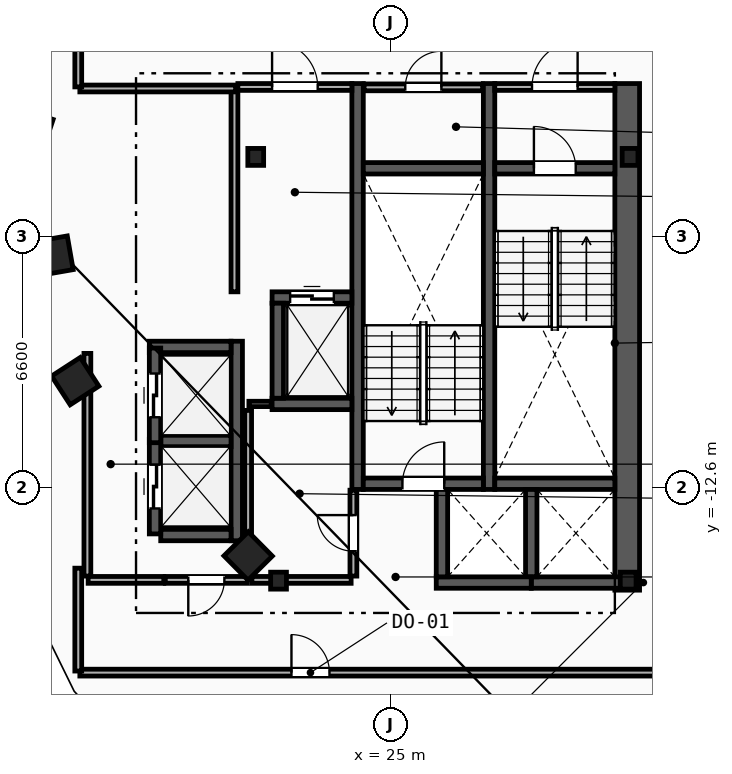
"""IFC4 building model, lengths in metres.
Left out: names, types, materials, properties, quantities, classifications, styles, units other than length and angle.
Written with IfcOpenShell. Run it as: python <this file> out.ifc"""

import sys

from ifc_helpers import new_model, si_unit, direction, frame, frame_2d, origin, origin_2d, place, context, subcontext, project, spatial, rectangle, i_section, extrude, element, fill, save


model = new_model("IFC4")
c1 = context("Model", 3, precision=1e-05, world=origin(), true_north=direction((0.0, 1.0)))
c2 = subcontext(c1, "Body", "Model", "MODEL_VIEW")
j1 = project(units=[si_unit("LENGTHUNIT", "METRE"), si_unit("PLANEANGLEUNIT", "RADIAN")], contexts=[c1])
p1 = place(None, origin())
s1 = spatial("IfcSite", under=j1, at=p1, CompositionType="ELEMENT")
p2 = place(p1, origin())
s2 = spatial("IfcBuilding", under=s1, at=p2, CompositionType="ELEMENT")
p3 = place(p2, frame((0.0, 0.0, 206.2)))
s3 = spatial("IfcBuildingStorey", under=s2, at=p3, CompositionType="ELEMENT", Elevation=206.2)
for number, where, z_axis, x_axis in (
    (1, (31.3, -3.9, 0.0), (0.0, 0.0, 1.0), (1.0, 0.0, 0.0)),
    (2, (21.45, -3.9, 0.0), (0.0, 0.0, 1.0), (1.0, 0.0, 0.0)),
    (3, (22.05, -15.05, 0.0), (0.0, 0.0, 1.0), (1.0, 0.0, 0.0)),
    (4, (31.25, -15.05, 0.0), (0.0, 0.0, 1.0), (1.0, 0.0, 0.0)),
):
    element("IfcColumn", number, at=place(p3, frame(where, z_axis=z_axis, x_axis=x_axis)), inside=s3, PredefinedType="COLUMN", context=c2, shape_type="SweptSolid", body=[
        extrude(i_section(OverallWidth=0.416, OverallDepth=0.446, WebThickness=0.039, FlangeThickness=0.063, FilletRadius=0.018, at=origin_2d()), origin(), (0.0, 0.0, 1.0), 3.6),
    ])
for number, where, z_axis, x_axis in (
    (5, (15.55, -3.2, 0.0), (0.0, 0.0, 1.0), (-0.315, -0.949, 0.0)),
    (6, (16.125, -6.5, 0.0), (0.0, 0.0, 1.0), (0.172, -0.985, 0.0)),
    (7, (16.7, -9.8, 0.0), (0.0, 0.0, 1.0), (0.544, -0.839, 0.0)),
    (8, (21.25, -14.4, 0.0), (0.0, 0.0, 1.0), (0.703, -0.711, 0.0)),
):
    element("IfcColumn", number, at=place(p3, frame(where, z_axis=z_axis, x_axis=x_axis)), inside=s3, PredefinedType="COLUMN", context=c2, shape_type="SweptSolid", body=[
        extrude(rectangle(XDim=0.9, YDim=0.9, at=origin_2d()), origin(), (0.0, 0.0, 1.0), 3.6),
    ])
p4 = place(p3, frame((31.225, -15.3, 0.0), z_axis=(0.0, 0.0, 1.0), x_axis=(0.0, 1.0, 0.0)))
e9 = element("IfcWall", 9, at=p4, inside=s3, PredefinedType="SHEAR", context=c2, shape_type="SweptSolid", body=[
    extrude(rectangle(XDim=13.33, YDim=0.65, at=frame_2d((6.665, 0.0))), origin(), (0.0, 0.0, 1.0), 3.34),
])
for number, where, z_axis, x_axis in (
    (10, (27.59, -12.65, 0.0), (0.0, 0.0, 1.0), (0.0, 1.0, 0.0)),
    (11, (24.13, -12.65, 0.0), (0.0, 0.0, 1.0), (0.0, 1.0, 0.0)),
):
    element("IfcWall", number, at=place(p3, frame(where, z_axis=z_axis, x_axis=x_axis)), inside=s3, PredefinedType="SHEAR", context=c2, shape_type="SweptSolid", body=[
        extrude(rectangle(XDim=10.68, YDim=0.3, at=frame_2d((5.34, 0.0))), origin(), (0.0, 0.0, 1.0), 3.34),
    ])
p5 = place(p3, frame((27.74, -4.2, 0.0), z_axis=(0.0, 0.0, 1.0), x_axis=(1.0, 0.0, 0.0)))
e12 = element("IfcWall", 12, at=p5, inside=s3, PredefinedType="SHEAR", context=c2, shape_type="SweptSolid", body=[
    extrude(rectangle(XDim=3.16, YDim=0.3, at=frame_2d((1.58, 0.0))), origin(), (0.0, 0.0, 1.0), 3.34),
])
p6 = place(p5, frame((1.03, 0.0, 0.0)))
e13 = element("IfcOpeningElement", 13, at=p6, cuts=e12, PredefinedType="OPENING", context=c2, shape_type="SweptSolid", body=[
    extrude(rectangle(XDim=1.1, YDim=2.15, at=frame_2d((0.55, 1.075))), frame((0.0, 0.16, 0.0), z_axis=(0.0, -1.0, 0.0), x_axis=(1.0, 0.0, 0.0)), (0.0, 0.0, 1.0), 0.32),
])
p7 = place(p3, frame((27.74, -12.5, 0.0), z_axis=(0.0, 0.0, 1.0), x_axis=(1.0, 0.0, 0.0)))
e14 = element("IfcWall", 14, at=p7, inside=s3, PredefinedType="SHEAR", context=c2, shape_type="SweptSolid", body=[
    extrude(rectangle(XDim=3.16, YDim=0.3, at=frame_2d((1.58, 0.0))), origin(), (0.0, 0.0, 1.0), 3.34),
])
p8 = place(p3, frame((24.28, -12.5, 0.0), z_axis=(0.0, 0.0, 1.0), x_axis=(1.0, 0.0, 0.0)))
e15 = element("IfcWall", 15, at=p8, inside=s3, PredefinedType="SHEAR", context=c2, shape_type="SweptSolid", body=[
    extrude(rectangle(XDim=3.16, YDim=0.3, at=frame_2d((1.58, 0.0))), origin(), (0.0, 0.0, 1.0), 3.34),
])
p9 = place(p8, frame((1.03, 0.0, 0.0)))
e16 = element("IfcOpeningElement", 16, at=p9, cuts=e15, PredefinedType="OPENING", context=c2, shape_type="SweptSolid", body=[
    extrude(rectangle(XDim=1.1, YDim=2.15, at=frame_2d((0.55, 1.075))), frame((0.0, 0.16, 0.0), z_axis=(0.0, -1.0, 0.0), x_axis=(1.0, 0.0, 0.0)), (0.0, 0.0, 1.0), 0.32),
])
p10 = place(p3, frame((24.28, -4.2, 0.0), z_axis=(0.0, 0.0, 1.0), x_axis=(1.0, 0.0, 0.0)))
e17 = element("IfcWall", 17, at=p10, inside=s3, PredefinedType="SHEAR", context=c2, shape_type="SweptSolid", body=[
    extrude(rectangle(XDim=3.16, YDim=0.3, at=frame_2d((1.58, 0.0))), origin(), (0.0, 0.0, 1.0), 3.34),
])
p11 = place(p3, frame((20.89, -7.45, 0.0), z_axis=(0.0, 0.0, 1.0), x_axis=(0.0, 1.0, 0.0)))
e18 = element("IfcWall", 18, at=p11, inside=s3, PredefinedType="PARTITIONING", context=c2, shape_type="SweptSolid", body=[
    extrude(rectangle(XDim=5.3, YDim=0.18, at=frame_2d((2.65, 0.0))), origin(), (0.0, 0.0, 1.0), 3.34),
])
p12 = place(p3, frame((20.98, -2.06, 0.0), z_axis=(0.0, 0.0, 1.0), x_axis=(1.0, 0.0, 0.0)))
e19 = element("IfcWall", 19, at=p12, inside=s3, PredefinedType="PARTITIONING", context=c2, shape_type="SweptSolid", body=[
    extrude(rectangle(XDim=3.0, YDim=0.18, at=frame_2d((1.5, 0.0))), origin(), (0.0, 0.0, 1.0), 3.34),
])
p13 = place(p12, frame((0.9, 0.0, 0.0)))
e20 = element("IfcOpeningElement", 20, at=p13, cuts=e19, PredefinedType="OPENING", context=c2, shape_type="SweptSolid", body=[
    extrude(rectangle(XDim=1.2, YDim=2.15, at=frame_2d((0.6, 1.075))), frame((0.0, 0.1, 0.0), z_axis=(0.0, -1.0, 0.0), x_axis=(1.0, 0.0, 0.0)), (0.0, 0.0, 1.0), 0.2),
])
p14 = place(p3, frame((27.74, -2.06, 0.0), z_axis=(0.0, 0.0, 1.0), x_axis=(1.0, 0.0, 0.0)))
e21 = element("IfcWall", 21, at=p14, inside=s3, PredefinedType="PARTITIONING", context=c2, shape_type="SweptSolid", body=[
    extrude(rectangle(XDim=3.16, YDim=0.18, at=frame_2d((1.58, 0.0))), origin(), (0.0, 0.0, 1.0), 3.34),
])
p15 = place(p14, frame((0.98, 0.0, 0.0)))
e22 = element("IfcOpeningElement", 22, at=p15, cuts=e21, PredefinedType="OPENING", context=c2, shape_type="SweptSolid", body=[
    extrude(rectangle(XDim=1.2, YDim=2.15, at=frame_2d((0.6, 1.075))), frame((0.0, 0.1, 0.0), z_axis=(0.0, -1.0, 0.0), x_axis=(1.0, 0.0, 0.0)), (0.0, 0.0, 1.0), 0.2),
])
p16 = place(p3, frame((21.88, -7.6, 0.0), z_axis=(0.0, 0.0, 1.0), x_axis=(1.0, 0.0, 0.0)))
e23 = element("IfcWall", 23, at=p16, inside=s3, PredefinedType="SHEAR", context=c2, shape_type="SweptSolid", body=[
    extrude(rectangle(XDim=2.1, YDim=0.3, at=frame_2d((1.05, 0.0))), origin(), (0.0, 0.0, 1.0), 3.34),
])
p17 = place(p16, frame((0.475, 0.0, 0.0)))
e24 = element("IfcOpeningElement", 24, at=p17, cuts=e23, PredefinedType="OPENING", context=c2, shape_type="SweptSolid", body=[
    extrude(rectangle(XDim=1.15, YDim=2.2, at=frame_2d((0.575, 1.1))), frame((0.0, 0.16, 0.0), z_axis=(0.0, -1.0, 0.0), x_axis=(1.0, 0.0, 0.0)), (0.0, 0.0, 1.0), 0.32),
])
p18 = place(p3, frame((21.88, -10.4, 0.0), z_axis=(0.0, 0.0, 1.0), x_axis=(1.0, 0.0, 0.0)))
e25 = element("IfcWall", 25, at=p18, inside=s3, PredefinedType="SHEAR", context=c2, shape_type="SweptSolid", body=[
    extrude(rectangle(XDim=2.1, YDim=0.3, at=frame_2d((1.05, 0.0))), origin(), (0.0, 0.0, 1.0), 3.34),
])
for number, where, z_axis, x_axis in (
    (26, (22.03, -10.25, 0.0), (0.0, 0.0, 1.0), (0.0, 1.0, 0.0)),
    (27, (28.7, -15.1, 0.0), (0.0, 0.0, 1.0), (1.0, 0.0, 0.0)),
):
    element("IfcWall", number, at=place(p3, frame(where, z_axis=z_axis, x_axis=x_axis)), inside=s3, PredefinedType="SHEAR", context=c2, shape_type="SweptSolid", body=[
        extrude(rectangle(XDim=2.5, YDim=0.3, at=frame_2d((1.25, 0.0))), origin(), (0.0, 0.0, 1.0), 3.34),
    ])
p19 = place(p3, frame((28.7, -14.95, 0.0), z_axis=(0.0, 0.0, 1.0), x_axis=(0.0, 1.0, 0.0)))
e28 = element("IfcWall", 28, at=p19, inside=s3, PredefinedType="SHEAR", context=c2, shape_type="SweptSolid", body=[
    extrude(rectangle(XDim=2.3, YDim=0.3, at=frame_2d((1.15, 0.0))), origin(), (0.0, 0.0, 1.0), 3.34),
])
p20 = place(p3, frame((26.2, -15.1, 0.0), z_axis=(0.0, 0.0, 1.0), x_axis=(1.0, 0.0, 0.0)))
e29 = element("IfcWall", 29, at=p20, inside=s3, PredefinedType="SHEAR", context=c2, shape_type="SweptSolid", body=[
    extrude(rectangle(XDim=2.5, YDim=0.3, at=frame_2d((1.25, 0.0))), origin(), (0.0, 0.0, 1.0), 3.34),
])
p21 = place(p3, frame((26.35, -14.95, 0.0), z_axis=(0.0, 0.0, 1.0), x_axis=(0.0, 1.0, 0.0)))
e30 = element("IfcWall", 30, at=p21, inside=s3, PredefinedType="SHEAR", context=c2, shape_type="SweptSolid", body=[
    extrude(rectangle(XDim=2.3, YDim=0.3, at=frame_2d((1.15, 0.0))), origin(), (0.0, 0.0, 1.0), 3.34),
])
p22 = place(p3, frame((20.95, -14.0, 0.0), z_axis=(0.0, 0.0, 1.0), x_axis=(0.0, 1.0, 0.0)))
e31 = element("IfcWall", 31, at=p22, inside=s3, PredefinedType="SHEAR", context=c2, shape_type="SweptSolid", body=[
    extrude(rectangle(XDim=5.25, YDim=0.3, at=frame_2d((2.625, 0.0))), origin(), (0.0, 0.0, 1.0), 3.34),
])
p23 = place(p3, frame((18.95, -13.85, 0.0), z_axis=(0.0, 0.0, 1.0), x_axis=(1.0, 0.0, 0.0)))
e32 = element("IfcWall", 32, at=p23, inside=s3, PredefinedType="SHEAR", context=c2, shape_type="SweptSolid", body=[
    extrude(rectangle(XDim=1.85, YDim=0.3, at=frame_2d((0.925, 0.0))), origin(), (0.0, 0.0, 1.0), 3.34),
])
p24 = place(p3, frame((18.65, -8.9, 0.0), z_axis=(0.0, 0.0, 1.0), x_axis=(1.0, 0.0, 0.0)))
e33 = element("IfcWall", 33, at=p24, inside=s3, PredefinedType="SHEAR", context=c2, shape_type="SweptSolid", body=[
    extrude(rectangle(XDim=2.15, YDim=0.3, at=frame_2d((1.075, 0.0))), origin(), (0.0, 0.0, 1.0), 3.34),
])
p25 = place(p3, frame((18.95, -11.375, 0.0), z_axis=(0.0, 0.0, 1.0), x_axis=(1.0, 0.0, 0.0)))
e34 = element("IfcWall", 34, at=p25, inside=s3, PredefinedType="SHEAR", context=c2, shape_type="SweptSolid", body=[
    extrude(rectangle(XDim=1.85, YDim=0.3, at=frame_2d((0.925, 0.0))), origin(), (0.0, 0.0, 1.0), 3.34),
])
p26 = place(p3, frame((18.8, -13.82, 0.0), z_axis=(0.0, 0.0, 1.0), x_axis=(0.0, 1.0, 0.0)))
e35 = element("IfcWall", 35, at=p26, inside=s3, PredefinedType="SHEAR", context=c2, shape_type="SweptSolid", body=[
    extrude(rectangle(XDim=2.49, YDim=0.3, at=frame_2d((1.245, 0.0))), origin(), (0.0, 0.0, 1.0), 3.34),
])
p27 = place(p26, frame((0.67, 0.0, 0.0)))
e36 = element("IfcOpeningElement", 36, at=p27, cuts=e35, PredefinedType="OPENING", context=c2, shape_type="SweptSolid", body=[
    extrude(rectangle(XDim=1.15, YDim=2.2, at=frame_2d((0.575, 1.1))), frame((0.0, 0.16, 0.0), z_axis=(0.0, -1.0, 0.0), x_axis=(1.0, 0.0, 0.0)), (0.0, 0.0, 1.0), 0.32),
])
p28 = place(p3, frame((18.8, -11.42, 0.0), z_axis=(0.0, 0.0, 1.0), x_axis=(0.0, 1.0, 0.0)))
e37 = element("IfcWall", 37, at=p28, inside=s3, PredefinedType="SHEAR", context=c2, shape_type="SweptSolid", body=[
    extrude(rectangle(XDim=2.49, YDim=0.3, at=frame_2d((1.245, 0.0))), origin(), (0.0, 0.0, 1.0), 3.34),
])
p29 = place(p28, frame((0.67, 0.0, 0.0)))
e38 = element("IfcOpeningElement", 38, at=p29, cuts=e37, PredefinedType="OPENING", context=c2, shape_type="SweptSolid", body=[
    extrude(rectangle(XDim=1.15, YDim=2.2, at=frame_2d((0.575, 1.1))), frame((0.0, 0.16, 0.0), z_axis=(0.0, -1.0, 0.0), x_axis=(1.0, 0.0, 0.0)), (0.0, 0.0, 1.0), 0.32),
])
p30 = place(p3, frame((17.02, -14.93, 0.0), z_axis=(0.0, 0.0, 1.0), x_axis=(0.0, 1.0, 0.0)))
e39 = element("IfcWall", 39, at=p30, inside=s3, PredefinedType="PARTITIONING", context=c2, shape_type="SweptSolid", body=[
    extrude(rectangle(XDim=5.86, YDim=0.18, at=frame_2d((2.93, 0.0))), origin(), (0.0, 0.0, 1.0), 3.34),
])
p31 = place(p3, frame((17.04, -15.03, 0.0), z_axis=(0.0, 0.0, 1.0), x_axis=(1.0, 0.0, 0.0)))
e40 = element("IfcWall", 40, at=p31, inside=s3, PredefinedType="PARTITIONING", context=c2, shape_type="SweptSolid", body=[
    extrude(rectangle(XDim=1.99, YDim=0.18, at=frame_2d((0.995, 0.0))), origin(), (0.0, 0.0, 1.0), 3.34),
])
p32 = place(p3, frame((21.23, -15.03, 0.0), z_axis=(0.0, 0.0, 1.0), x_axis=(-1.0, 0.0, 0.0)))
e41 = element("IfcWall", 41, at=p32, inside=s3, PredefinedType="PARTITIONING", context=c2, shape_type="SweptSolid", body=[
    extrude(rectangle(XDim=2.16, YDim=0.18, at=frame_2d((1.08, 0.0))), origin(), (0.0, 0.0, 1.0), 3.34),
])
p33 = place(p32, frame((0.605, 0.0, 0.0)))
e42 = element("IfcOpeningElement", 42, at=p33, cuts=e41, PredefinedType="OPENING", context=c2, shape_type="SweptSolid", body=[
    extrude(rectangle(XDim=0.95, YDim=2.1, at=frame_2d((0.475, 1.05))), frame((0.0, 0.1, 0.0), z_axis=(0.0, -1.0, 0.0), x_axis=(1.0, 0.0, 0.0)), (0.0, 0.0, 1.0), 0.2),
])
p34 = place(p3, frame((21.27, -10.4, 0.0), z_axis=(0.0, 0.0, 1.0), x_axis=(1.0, 0.0, 0.0)))
e43 = element("IfcWall", 43, at=p34, inside=s3, PredefinedType="PARTITIONING", context=c2, shape_type="SweptSolid", body=[
    extrude(rectangle(XDim=0.59, YDim=0.14, at=frame_2d((0.295, 0.0))), origin(), (0.0, 0.0, 1.0), 3.34),
])
p35 = place(p3, frame((21.25, -14.93, 0.0), z_axis=(0.0, 0.0, 1.0), x_axis=(0.0, 1.0, 0.0)))
e44 = element("IfcWall", 44, at=p35, inside=s3, PredefinedType="PARTITIONING", context=c2, shape_type="SweptSolid", body=[
    extrude(rectangle(XDim=4.36, YDim=0.18, at=frame_2d((2.18, 0.0))), origin(), (0.0, 0.0, 1.0), 3.34),
])
p36 = place(p3, frame((21.35, -15.03, 0.0), z_axis=(0.0, 0.0, 1.0), x_axis=(1.0, 0.0, 0.0)))
e45 = element("IfcWall", 45, at=p36, inside=s3, PredefinedType="PARTITIONING", context=c2, shape_type="SweptSolid", body=[
    extrude(rectangle(XDim=2.61, YDim=0.18, at=frame_2d((1.305, 0.0))), origin(), (0.0, 0.0, 1.0), 2.413),
])
p37 = place(p3, frame((24.3, -2.07, 0.0), z_axis=(0.0, 0.0, 1.0), x_axis=(1.0, 0.0, 0.0)))
e46 = element("IfcWall", 46, at=p37, inside=s3, PredefinedType="PARTITIONING", context=c2, shape_type="SweptSolid", body=[
    extrude(rectangle(XDim=3.12, YDim=0.18, at=frame_2d((1.56, 0.0))), origin(), (0.0, 0.0, 1.0), 3.34),
])
p38 = place(p37, frame((1.085, 0.0, 0.0)))
e47 = element("IfcOpeningElement", 47, at=p38, cuts=e46, PredefinedType="OPENING", context=c2, shape_type="SweptSolid", body=[
    extrude(rectangle(XDim=0.95, YDim=2.1, at=frame_2d((0.475, 1.05))), frame((0.0, 0.1, 0.0), z_axis=(0.0, -1.0, 0.0), x_axis=(1.0, 0.0, 0.0)), (0.0, 0.0, 1.0), 0.2),
])
p39 = place(p3, frame((24.02, -14.93, 0.0), z_axis=(0.0, 0.0, 1.0), x_axis=(0.0, 1.0, 0.0)))
e48 = element("IfcWall", 48, at=p39, inside=s3, PredefinedType="PARTITIONING", context=c2, shape_type="SweptSolid", body=[
    extrude(rectangle(XDim=2.26, YDim=0.18, at=frame_2d((1.13, 0.0))), origin(), (0.0, 0.0, 1.0), 3.34),
])
p40 = place(p39, frame((0.655, 0.0, 0.0)))
e49 = element("IfcOpeningElement", 49, at=p40, cuts=e48, PredefinedType="OPENING", context=c2, shape_type="SweptSolid", body=[
    extrude(rectangle(XDim=0.95, YDim=2.1, at=frame_2d((0.475, 1.05))), frame((0.0, 0.1, 0.0), z_axis=(0.0, -1.0, 0.0), x_axis=(1.0, 0.0, 0.0)), (0.0, 0.0, 1.0), 0.2),
])
p41 = place(p3, frame((16.822, -17.47, 0.0), z_axis=(0.0, 0.0, 1.0), x_axis=(1.0, 0.0, 0.0)))
e50 = element("IfcWall", 50, at=p41, inside=s3, PredefinedType="PARTITIONING", context=c2, shape_type="SweptSolid", body=[
    extrude(rectangle(XDim=16.807, YDim=0.18, at=frame_2d((8.403, 0.0))), origin(), (0.0, 0.0, 1.0), 3.34),
])
p42 = place(p41, frame((5.569, 0.0, 0.0)))
e51 = element("IfcOpeningElement", 51, at=p42, cuts=e50, PredefinedType="OPENING", context=c2, shape_type="SweptSolid", body=[
    extrude(rectangle(XDim=1.0, YDim=2.15, at=frame_2d((0.5, 1.075))), frame((0.0, 0.1, 0.0), z_axis=(0.0, -1.0, 0.0), x_axis=(1.0, 0.0, 0.0)), (0.0, 0.0, 1.0), 0.2),
])
p43 = place(p3, frame((16.822, -2.1, 0.0), z_axis=(0.0, 0.0, 1.0), x_axis=(1.0, 0.0, 0.0)))
e52 = element("IfcWall", 52, at=p43, inside=s3, PredefinedType="PARTITIONING", context=c2, shape_type="SweptSolid", body=[
    extrude(rectangle(XDim=4.098, YDim=0.18, at=frame_2d((2.049, 0.0))), origin(), (0.0, 0.0, 1.0), 3.34),
])
p44 = place(p3, frame((16.78, -14.721, 0.0), z_axis=(0.0, 0.0, 1.0), x_axis=(0.0, -1.0, 0.0)))
e53 = element("IfcWall", 53, at=p44, inside=s3, PredefinedType="PARTITIONING", context=c2, shape_type="SweptSolid", body=[
    extrude(rectangle(XDim=2.707, YDim=0.18, at=frame_2d((1.354, 0.0))), origin(), (0.0, 0.0, 1.0), 3.34),
])
p45 = place(p3, frame((16.78, 0.329, 0.0), z_axis=(0.0, 0.0, 1.0), x_axis=(0.0, -1.0, 0.0)))
e54 = element("IfcWall", 54, at=p45, inside=s3, PredefinedType="PARTITIONING", context=c2, shape_type="SweptSolid", body=[
    extrude(rectangle(XDim=2.387, YDim=0.18, at=frame_2d((1.194, 0.0))), origin(), (0.0, 0.0, 1.0), 3.34),
])
p46 = place(p6, origin())
e55 = element("IfcDoor", 55, at=p46, inside=s3, OperationType="SINGLE_SWING_LEFT", PredefinedType="DOOR", context=c2, shape_type="SweptSolid", body=[
    extrude(rectangle(XDim=1.1, YDim=2.15, at=frame_2d((0.55, 1.075))), frame((0.0, 0.025, 0.0), z_axis=(0.0, -1.0, 0.0), x_axis=(1.0, 0.0, 0.0)), (0.0, 0.0, 1.0), 0.05),
])
fill(e13, e55)
p47 = place(p9, origin())
e56 = element("IfcDoor", 56, at=p47, inside=s3, OperationType="SINGLE_SWING_RIGHT", PredefinedType="DOOR", context=c2, shape_type="SweptSolid", body=[
    extrude(rectangle(XDim=1.1, YDim=2.15, at=frame_2d((0.55, 1.075))), frame((0.0, 0.025, 0.0), z_axis=(0.0, -1.0, 0.0), x_axis=(1.0, 0.0, 0.0)), (0.0, 0.0, 1.0), 0.05),
])
fill(e16, e56)
p48 = place(p13, origin())
e57 = element("IfcDoor", 57, at=p48, inside=s3, OperationType="SINGLE_SWING_LEFT", PredefinedType="DOOR", context=c2, shape_type="SweptSolid", body=[
    extrude(rectangle(XDim=1.2, YDim=2.15, at=frame_2d((0.6, 1.075))), frame((0.0, 0.025, 0.0), z_axis=(0.0, -1.0, 0.0), x_axis=(1.0, 0.0, 0.0)), (0.0, 0.0, 1.0), 0.05),
])
fill(e20, e57)
p49 = place(p15, origin())
e58 = element("IfcDoor", 58, at=p49, inside=s3, OperationType="SINGLE_SWING_RIGHT", PredefinedType="DOOR", context=c2, shape_type="SweptSolid", body=[
    extrude(rectangle(XDim=1.2, YDim=2.15, at=frame_2d((0.6, 1.075))), frame((0.0, 0.025, 0.0), z_axis=(0.0, -1.0, 0.0), x_axis=(1.0, 0.0, 0.0)), (0.0, 0.0, 1.0), 0.05),
])
fill(e22, e58)
p50 = place(p17, origin())
e59 = element("IfcDoor", 59, at=p50, inside=s3, OperationType="SLIDING_TO_LEFT", PredefinedType="TRAPDOOR", context=c2, shape_type="SweptSolid", body=[
    extrude(rectangle(XDim=1.15, YDim=2.2, at=frame_2d((0.575, 1.1))), frame((0.0, 0.025, 0.0), z_axis=(0.0, -1.0, 0.0), x_axis=(1.0, 0.0, 0.0)), (0.0, 0.0, 1.0), 0.05),
])
fill(e24, e59)
p51 = place(p27, origin())
e60 = element("IfcDoor", 60, at=p51, inside=s3, OperationType="SLIDING_TO_LEFT", PredefinedType="TRAPDOOR", context=c2, shape_type="SweptSolid", body=[
    extrude(rectangle(XDim=1.15, YDim=2.2, at=frame_2d((0.575, 1.1))), frame((0.0, 0.025, 0.0), z_axis=(0.0, -1.0, 0.0), x_axis=(1.0, 0.0, 0.0)), (0.0, 0.0, 1.0), 0.05),
])
fill(e36, e60)
p52 = place(p29, origin())
e61 = element("IfcDoor", 61, at=p52, inside=s3, OperationType="SLIDING_TO_LEFT", PredefinedType="TRAPDOOR", context=c2, shape_type="SweptSolid", body=[
    extrude(rectangle(XDim=1.15, YDim=2.2, at=frame_2d((0.575, 1.1))), frame((0.0, 0.025, 0.0), z_axis=(0.0, -1.0, 0.0), x_axis=(1.0, 0.0, 0.0)), (0.0, 0.0, 1.0), 0.05),
])
fill(e38, e61)
p53 = place(p42, origin())
e62 = element("IfcDoor", 62, at=p53, inside=s3, OperationType="SINGLE_SWING_LEFT", PredefinedType="DOOR", context=c2, shape_type="SweptSolid", body=[
    extrude(rectangle(XDim=1.0, YDim=2.15, at=frame_2d((0.5, 1.075))), frame((0.0, 0.025, 0.0), z_axis=(0.0, -1.0, 0.0), x_axis=(1.0, 0.0, 0.0)), (0.0, 0.0, 1.0), 0.05),
])
fill(e51, e62)
p54 = place(p38, origin())
e63 = element("IfcDoor", 63, at=p54, inside=s3, OperationType="SINGLE_SWING_RIGHT", PredefinedType="DOOR", context=c2, shape_type="SweptSolid", body=[
    extrude(rectangle(XDim=0.95, YDim=2.1, at=frame_2d((0.475, 1.05))), frame((0.0, 0.025, 0.0), z_axis=(0.0, -1.0, 0.0), x_axis=(1.0, 0.0, 0.0)), (0.0, 0.0, 1.0), 0.05),
])
fill(e47, e63)
p55 = place(p40, origin())
e64 = element("IfcDoor", 64, at=p55, inside=s3, OperationType="SINGLE_SWING_RIGHT", PredefinedType="DOOR", context=c2, shape_type="SweptSolid", body=[
    extrude(rectangle(XDim=0.95, YDim=2.1, at=frame_2d((0.475, 1.05))), frame((0.0, 0.025, 0.0), z_axis=(0.0, -1.0, 0.0), x_axis=(1.0, 0.0, 0.0)), (0.0, 0.0, 1.0), 0.05),
])
fill(e49, e64)
p56 = place(p33, origin())
e65 = element("IfcDoor", 65, at=p56, inside=s3, OperationType="SINGLE_SWING_RIGHT", PredefinedType="DOOR", context=c2, shape_type="SweptSolid", body=[
    extrude(rectangle(XDim=0.95, YDim=2.1, at=frame_2d((0.475, 1.05))), frame((0.0, 0.025, 0.0), z_axis=(0.0, -1.0, 0.0), x_axis=(1.0, 0.0, 0.0)), (0.0, 0.0, 1.0), 0.05),
])
fill(e42, e65)
save(model, sys.argv[1])
